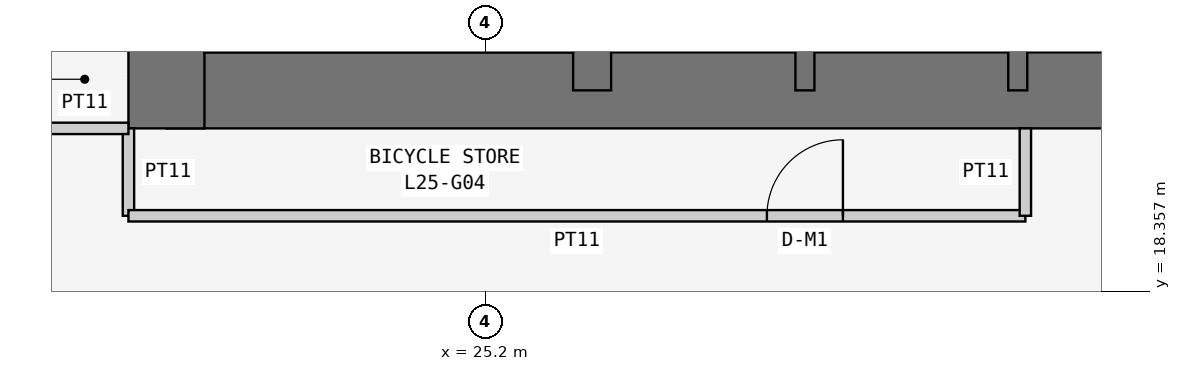
"""IFC4 building model, lengths in metres.
Left out: names, types, materials, properties, quantities, classifications, styles, units other than length and angle.
Written with IfcOpenShell. Run it as: python <this file> out.ifc"""

import sys

from ifc_helpers import new_model, si_unit, direction, frame, frame_2d, origin, place, context, subcontext, project, spatial, rectangle, extrude, element, fill, save


model = new_model("IFC4")
c1 = context("Model", 3, precision=1e-05, world=origin(), true_north=direction((0.0, 1.0)))
c2 = subcontext(c1, "Body", "Model", "MODEL_VIEW")
j1 = project(units=[si_unit("LENGTHUNIT", "METRE"), si_unit("PLANEANGLEUNIT", "RADIAN")], contexts=[c1])
p1 = place(None, origin())
s1 = spatial("IfcSite", under=j1, at=p1, CompositionType="ELEMENT")
p2 = place(p1, origin())
s2 = spatial("IfcBuilding", under=s1, at=p2, CompositionType="ELEMENT")
p3 = place(p2, frame((0.0, 0.0, 99.3)))
s3 = spatial("IfcBuildingStorey", under=s2, at=p3, CompositionType="ELEMENT", Elevation=99.3)
p4 = place(p3, frame((21.0, 21.0, 0.0), z_axis=(0.0, 0.0, 1.0), x_axis=(1.0, 0.0, 0.0)))
e1 = element("IfcWall", 1, at=p4, inside=s3, PredefinedType="SHEAR", context=c2, shape_type="SweptSolid", body=[
    extrude(rectangle(XDim=17.3, YDim=1.0, at=frame_2d((8.65, 0.0))), origin(), (0.0, 0.0, 1.0), 3.6),
])
p5 = place(p3, frame((21.0, 37.8, 0.0), z_axis=(0.0, 0.0, 1.0), x_axis=(0.0, -1.0, 0.0)))
e2 = element("IfcWall", 2, at=p5, inside=s3, PredefinedType="SHEAR", context=c2, shape_type="SweptSolid", body=[
    extrude(rectangle(XDim=17.3, YDim=1.0, at=frame_2d((8.65, 0.0))), origin(), (0.0, 0.0, 1.0), 3.6),
])
p6 = place(p5, frame((5.4, 0.0, 0.0)))
e3 = element("IfcOpeningElement", 3, at=p6, cuts=e2, PredefinedType="OPENING", context=c2, shape_type="SweptSolid", body=[
    extrude(rectangle(XDim=1.2, YDim=2.1, at=frame_2d((0.6, 1.05))), frame((0.0, 0.51, 0.0), z_axis=(0.0, -1.0, 0.0), x_axis=(1.0, 0.0, 0.0)), (0.0, 0.0, 1.0), 1.02),
])
p7 = place(p3, frame((26.6, 21.0, 0.0), z_axis=(0.0, 0.0, 1.0), x_axis=(0.0, 1.0, 0.0)))
e4 = element("IfcWall", 4, at=p7, inside=s3, PredefinedType="SHEAR", context=c2, shape_type="SweptSolid", body=[
    extrude(rectangle(XDim=16.8, YDim=0.5, at=frame_2d((8.4, 0.0))), origin(), (0.0, 0.0, 1.0), 3.6),
])
p8 = place(p7, frame((10.4, 0.0, 0.0)))
e5 = element("IfcOpeningElement", 5, at=p8, cuts=e4, PredefinedType="OPENING", context=c2, shape_type="SweptSolid", body=[
    extrude(rectangle(XDim=1.2, YDim=2.1, at=frame_2d((0.6, 1.05))), frame((0.0, 0.26, 0.0), z_axis=(0.0, -1.0, 0.0), x_axis=(1.0, 0.0, 0.0)), (0.0, 0.0, 1.0), 0.52),
])
for number, where, z_axis, x_axis in (
    (6, (29.4, 21.0, 0.0), (0.0, 0.0, 1.0), (0.0, 1.0, 0.0)),
    (7, (32.2, 21.0, 0.0), (0.0, 0.0, 1.0), (0.0, 1.0, 0.0)),
):
    element("IfcWall", number, at=place(p3, frame(where, z_axis=z_axis, x_axis=x_axis)), inside=s3, PredefinedType="SHEAR", context=c2, shape_type="SweptSolid", body=[
        extrude(rectangle(XDim=3.2, YDim=0.25, at=frame_2d((1.6, 0.0))), origin(), (0.0, 0.0, 1.0), 3.6),
    ])
p9 = place(p3, frame((20.5, 20.5, 0.0), z_axis=(0.0, 0.0, 1.0), x_axis=(0.0, -1.0, 0.0)))
e8 = element("IfcWall", 8, at=p9, inside=s3, PredefinedType="PARTITIONING", context=c2, shape_type="SweptSolid", body=[
    extrude(rectangle(XDim=1.15, YDim=0.15, at=frame_2d((0.575, 0.0))), origin(), (0.0, 0.0, 1.0), 3.35),
])
p10 = place(p3, frame((20.5, 19.35, 0.0), z_axis=(0.0, 0.0, 1.0), x_axis=(1.0, 0.0, 0.0)))
e9 = element("IfcWall", 9, at=p10, inside=s3, PredefinedType="PARTITIONING", context=c2, shape_type="SweptSolid", body=[
    extrude(rectangle(XDim=11.8, YDim=0.15, at=frame_2d((5.9, 0.0))), origin(), (0.0, 0.0, 1.0), 3.35),
])
p11 = place(p10, frame((8.4, 0.0, 0.0)))
e10 = element("IfcOpeningElement", 10, at=p11, cuts=e9, PredefinedType="OPENING", context=c2, shape_type="SweptSolid", body=[
    extrude(rectangle(XDim=1.0, YDim=2.1, at=frame_2d((0.5, 1.05))), frame((0.0, 0.085, 0.0), z_axis=(0.0, -1.0, 0.0), x_axis=(1.0, 0.0, 0.0)), (0.0, 0.0, 1.0), 0.17),
])
for number, where, z_axis, x_axis in (
    (11, (32.3, 19.35, 0.0), (0.0, 0.0, 1.0), (0.0, 1.0, 0.0)),
    (12, (19.35, 20.5, 0.0), (0.0, 0.0, 1.0), (1.0, 0.0, 0.0)),
):
    element("IfcWall", number, at=place(p3, frame(where, z_axis=z_axis, x_axis=x_axis)), inside=s3, PredefinedType="PARTITIONING", context=c2, shape_type="SweptSolid", body=[
        extrude(rectangle(XDim=1.15, YDim=0.15, at=frame_2d((0.575, 0.0))), origin(), (0.0, 0.0, 1.0), 3.35),
    ])
p12 = place(p11, origin())
e13 = element("IfcDoor", 13, at=p12, inside=s3, OperationType="SINGLE_SWING_RIGHT", PredefinedType="DOOR", context=c2, shape_type="SweptSolid", body=[
    extrude(rectangle(XDim=1.0, YDim=2.1, at=frame_2d((0.5, 1.05))), frame((0.0, 0.025, 0.0), z_axis=(0.0, -1.0, 0.0), x_axis=(1.0, 0.0, 0.0)), (0.0, 0.0, 1.0), 0.05),
])
fill(e10, e13)
save(model, sys.argv[1])
